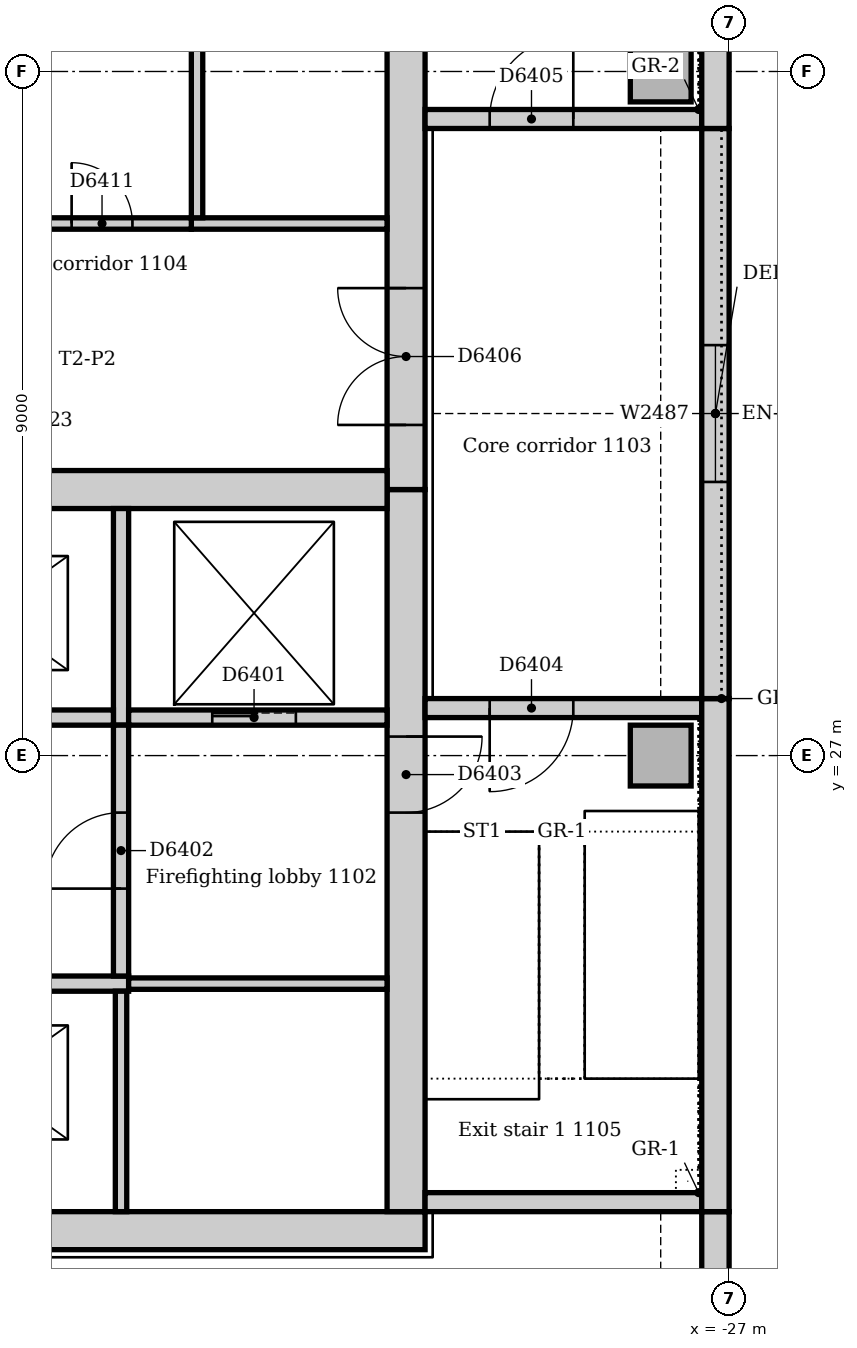
"""IFC4 building model, lengths in metres.
Left out: names, types, materials, properties, quantities, classifications, styles, units other than length and angle.
Written with IfcOpenShell. Run it as: python <this file> out.ifc"""

import sys

from ifc_helpers import new_model, si_unit, direction, frame, frame_2d, origin, origin_2d, place, context, subcontext, project, spatial, rectangle, extrude, element, fill, save


model = new_model("IFC4")
c1 = context("Model", 3, precision=1e-05, world=origin(), true_north=direction((0.0, 1.0)))
c2 = subcontext(c1, "Body", "Model", "MODEL_VIEW")
j1 = project(units=[si_unit("LENGTHUNIT", "METRE"), si_unit("PLANEANGLEUNIT", "RADIAN")], contexts=[c1])
p1 = place(None, origin())
s1 = spatial("IfcSite", under=j1, at=p1, CompositionType="ELEMENT")
p2 = place(p1, origin())
s2 = spatial("IfcBuilding", under=s1, at=p2, CompositionType="ELEMENT")
p3 = place(p2, frame((0.0, 0.0, 51.0)))
s3 = spatial("IfcBuildingStorey", under=s2, at=p3, CompositionType="ELEMENT", Elevation=51.0)
p4 = place(p3, frame((-42.5, 20.75, 0.0), z_axis=(0.0, 0.0, 1.0), x_axis=(1.0, 0.0, 0.0)))
e1 = element("IfcWall", 1, at=p4, inside=s3, PredefinedType="SOLIDWALL", context=c2, shape_type="SweptSolid", body=[
    extrude(rectangle(XDim=11.5, YDim=0.5, at=frame_2d((5.75, 0.0))), origin(), (0.0, 0.0, 1.0), 4.0),
])
p5 = place(p3, frame((-31.25, 21.0, 0.0), z_axis=(0.0, 0.0, 1.0), x_axis=(0.0, 1.0, 0.0)))
e2 = element("IfcWall", 2, at=p5, inside=s3, PredefinedType="SOLIDWALL", context=c2, shape_type="SweptSolid", body=[
    extrude(rectangle(XDim=9.5, YDim=0.5, at=frame_2d((4.75, 0.0))), origin(), (0.0, 0.0, 1.0), 4.0),
])
p6 = place(p5, frame((5.25, 0.0, 0.0)))
e3 = element("IfcOpeningElement", 3, at=p6, cuts=e2, PredefinedType="OPENING", context=c2, shape_type="SweptSolid", body=[
    extrude(rectangle(XDim=1.0, YDim=2.1, at=frame_2d((0.5, 1.05))), frame((0.0, 0.26, 0.0), z_axis=(0.0, -1.0, 0.0), x_axis=(1.0, 0.0, 0.0)), (0.0, 0.0, 1.0), 0.52),
])
p7 = place(p3, frame((-31.25, 30.5, 0.0), z_axis=(0.0, 0.0, 1.0), x_axis=(0.0, 1.0, 0.0)))
e4 = element("IfcWall", 4, at=p7, inside=s3, PredefinedType="SOLIDWALL", context=c2, shape_type="SweptSolid", body=[
    extrude(rectangle(XDim=11.5, YDim=0.5, at=frame_2d((5.75, 0.0))), origin(), (0.0, 0.0, 1.0), 4.0),
])
p8 = place(p7, frame((0.85, 0.0, 0.0)))
e5 = element("IfcOpeningElement", 5, at=p8, cuts=e4, PredefinedType="OPENING", context=c2, shape_type="SweptSolid", body=[
    extrude(rectangle(XDim=1.8, YDim=2.1, at=frame_2d((0.9, 1.05))), frame((0.0, 0.26, 0.0), z_axis=(0.0, -1.0, 0.0), x_axis=(1.0, 0.0, 0.0)), (0.0, 0.0, 1.0), 0.52),
])
p9 = place(p3, frame((-42.0, 30.5, 0.0), z_axis=(0.0, 0.0, 1.0), x_axis=(1.0, 0.0, 0.0)))
e6 = element("IfcWall", 6, at=p9, inside=s3, PredefinedType="SOLIDWALL", context=c2, shape_type="SweptSolid", body=[
    extrude(rectangle(XDim=10.5, YDim=0.5, at=frame_2d((5.25, 0.0))), origin(), (0.0, 0.0, 1.0), 4.0),
])
p10 = place(p3, frame((-31.0, 21.125, 0.0), z_axis=(0.0, 0.0, 1.0), x_axis=(1.0, 0.0, 0.0)))
e7 = element("IfcWall", 7, at=p10, inside=s3, PredefinedType="SOLIDWALL", context=c2, shape_type="SweptSolid", body=[
    extrude(rectangle(XDim=3.64, YDim=0.25, at=frame_2d((1.82, 0.0))), origin(), (0.0, 0.0, 1.0), 4.0),
])
p11 = place(p3, frame((-27.36, 27.625, 0.0), z_axis=(0.0, 0.0, 1.0), x_axis=(-1.0, 0.0, 0.0)))
e8 = element("IfcWall", 8, at=p11, inside=s3, PredefinedType="SOLIDWALL", context=c2, shape_type="SweptSolid", body=[
    extrude(rectangle(XDim=3.64, YDim=0.25, at=frame_2d((1.82, 0.0))), origin(), (0.0, 0.0, 1.0), 4.0),
])
p12 = place(p11, frame((1.69, 0.0, 0.0)))
e9 = element("IfcOpeningElement", 9, at=p12, cuts=e8, PredefinedType="OPENING", context=c2, shape_type="SweptSolid", body=[
    extrude(rectangle(XDim=1.1, YDim=2.1, at=frame_2d((0.55, 1.05))), frame((0.0, 0.135, 0.0), z_axis=(0.0, -1.0, 0.0), x_axis=(1.0, 0.0, 0.0)), (0.0, 0.0, 1.0), 0.27),
])
p13 = place(p3, frame((-31.0, 35.375, 0.0), z_axis=(0.0, 0.0, 1.0), x_axis=(1.0, 0.0, 0.0)))
e10 = element("IfcWall", 10, at=p13, inside=s3, PredefinedType="SOLIDWALL", context=c2, shape_type="SweptSolid", body=[
    extrude(rectangle(XDim=3.64, YDim=0.25, at=frame_2d((1.82, 0.0))), origin(), (0.0, 0.0, 1.0), 4.0),
])
p14 = place(p13, frame((0.85, 0.0, 0.0)))
e11 = element("IfcOpeningElement", 11, at=p14, cuts=e10, PredefinedType="OPENING", context=c2, shape_type="SweptSolid", body=[
    extrude(rectangle(XDim=1.1, YDim=2.1, at=frame_2d((0.55, 1.05))), frame((0.0, 0.135, 0.0), z_axis=(0.0, -1.0, 0.0), x_axis=(1.0, 0.0, 0.0)), (0.0, 0.0, 1.0), 0.27),
])
for number, where, z_axis, x_axis in (
    (12, (-27.9, 27.0, 0.0), (0.0, 0.0, 1.0), (1.0, 0.0, 0.0)),
    (13, (-27.9, 36.0, 0.0), (0.0, 0.0, 1.0), (1.0, 0.0, 0.0)),
):
    element("IfcColumn", number, at=place(p3, frame(where, z_axis=z_axis, x_axis=x_axis)), inside=s3, PredefinedType="COLUMN", context=c2, shape_type="SweptSolid", body=[
        extrude(rectangle(XDim=0.8, YDim=0.8, at=origin_2d()), origin(), (0.0, 0.0, 1.0), 4.0),
    ])
p15 = place(p3, frame((-27.18, 13.243, 0.0), z_axis=(0.0, 0.0, 1.0), x_axis=(0.0, 1.0, 0.0)))
e14 = element("IfcWall", 14, at=p15, inside=s3, PredefinedType="STANDARD", context=c2, shape_type="SweptSolid", body=[
    extrude(rectangle(XDim=7.757, YDim=0.36, at=frame_2d((3.879, 0.0))), origin(), (0.0, 0.0, 1.0), 3.85),
])
p16 = place(p15, frame((1.982, 0.0, 0.9)))
e15 = element("IfcOpeningElement", 15, at=p16, cuts=e14, PredefinedType="OPENING", context=c2, shape_type="SweptSolid", body=[
    extrude(rectangle(XDim=3.3, YDim=1.6, at=frame_2d((1.65, 0.8))), frame((0.0, 0.19, 0.0), z_axis=(0.0, -1.0, 0.0), x_axis=(1.0, 0.0, 0.0)), (0.0, 0.0, 1.0), 0.38),
])
p17 = place(p3, frame((-27.18, 21.0, 0.0), z_axis=(0.0, 0.0, 1.0), x_axis=(0.0, 1.0, 0.0)))
e16 = element("IfcWall", 16, at=p17, inside=s3, PredefinedType="STANDARD", context=c2, shape_type="SweptSolid", body=[
    extrude(rectangle(XDim=6.75, YDim=0.36, at=frame_2d((3.375, 0.0))), origin(), (0.0, 0.0, 1.0), 3.85),
])
p18 = place(p3, frame((-27.18, 27.75, 0.0), z_axis=(0.0, 0.0, 1.0), x_axis=(0.0, 1.0, 0.0)))
e17 = element("IfcWall", 17, at=p18, inside=s3, PredefinedType="STANDARD", context=c2, shape_type="SweptSolid", body=[
    extrude(rectangle(XDim=7.5, YDim=0.36, at=frame_2d((3.75, 0.0))), origin(), (0.0, 0.0, 1.0), 3.85),
])
p19 = place(p18, frame((2.85, 0.0, 1.2)))
e18 = element("IfcOpeningElement", 18, at=p19, cuts=e17, PredefinedType="OPENING", context=c2, shape_type="SweptSolid", body=[
    extrude(rectangle(XDim=1.8, YDim=1.2, at=frame_2d((0.9, 0.6))), frame((0.0, 0.19, 0.0), z_axis=(0.0, -1.0, 0.0), x_axis=(1.0, 0.0, 0.0)), (0.0, 0.0, 1.0), 0.38),
])
p20 = place(p3, frame((-27.18, 35.25, 0.0), z_axis=(0.0, 0.0, 1.0), x_axis=(0.0, 1.0, 0.0)))
e19 = element("IfcWall", 19, at=p20, inside=s3, PredefinedType="STANDARD", context=c2, shape_type="SweptSolid", body=[
    extrude(rectangle(XDim=6.75, YDim=0.36, at=frame_2d((3.375, 0.0))), origin(), (0.0, 0.0, 1.0), 3.85),
])
p21 = place(p3, frame((-34.9, 24.0, 0.0), z_axis=(0.0, 0.0, 1.0), x_axis=(-1.0, 0.0, 0.0)))
e20 = element("IfcWall", 20, at=p21, inside=s3, PredefinedType="SOLIDWALL", context=c2, shape_type="SweptSolid", body=[
    extrude(rectangle(XDim=3.5, YDim=0.2, at=frame_2d((1.75, 0.0))), origin(), (0.0, 0.0, 1.0), 4.0),
])
p22 = place(p21, frame((1.3, 0.0, 0.0)))
e21 = element("IfcOpeningElement", 21, at=p22, cuts=e20, PredefinedType="OPENING", context=c2, shape_type="SweptSolid", body=[
    extrude(rectangle(XDim=1.1, YDim=2.1, at=frame_2d((0.55, 1.05))), frame((0.0, 0.11, 0.0), z_axis=(0.0, -1.0, 0.0), x_axis=(1.0, 0.0, 0.0)), (0.0, 0.0, 1.0), 0.22),
])
p23 = place(p3, frame((-35.0, 27.4, 0.0), z_axis=(0.0, 0.0, 1.0), x_axis=(0.0, 1.0, 0.0)))
e22 = element("IfcWall", 22, at=p23, inside=s3, PredefinedType="SOLIDWALL", context=c2, shape_type="SweptSolid", body=[
    extrude(rectangle(XDim=2.85, YDim=0.2, at=frame_2d((1.425, 0.0))), origin(), (0.0, 0.0, 1.0), 4.0),
])
p24 = place(p3, frame((-38.4, 27.5, 0.0), z_axis=(0.0, 0.0, 1.0), x_axis=(1.0, 0.0, 0.0)))
e23 = element("IfcWall", 23, at=p24, inside=s3, PredefinedType="SOLIDWALL", context=c2, shape_type="SweptSolid", body=[
    extrude(rectangle(XDim=3.3, YDim=0.2, at=frame_2d((1.65, 0.0))), origin(), (0.0, 0.0, 1.0), 4.0),
])
p25 = place(p24, frame((1.1, 0.0, 0.0)))
e24 = element("IfcOpeningElement", 24, at=p25, cuts=e23, PredefinedType="OPENING", context=c2, shape_type="SweptSolid", body=[
    extrude(rectangle(XDim=1.1, YDim=2.1, at=frame_2d((0.55, 1.05))), frame((0.0, 0.11, 0.0), z_axis=(0.0, -1.0, 0.0), x_axis=(1.0, 0.0, 0.0)), (0.0, 0.0, 1.0), 0.22),
])
p26 = place(p3, frame((-34.9, 27.5, 0.0), z_axis=(0.0, 0.0, 1.0), x_axis=(1.0, 0.0, 0.0)))
e25 = element("IfcWall", 25, at=p26, inside=s3, PredefinedType="SOLIDWALL", context=c2, shape_type="SweptSolid", body=[
    extrude(rectangle(XDim=3.4, YDim=0.2, at=frame_2d((1.7, 0.0))), origin(), (0.0, 0.0, 1.0), 4.0),
])
p27 = place(p26, frame((1.1, 0.0, 0.0)))
e26 = element("IfcOpeningElement", 26, at=p27, cuts=e25, PredefinedType="OPENING", context=c2, shape_type="SweptSolid", body=[
    extrude(rectangle(XDim=1.1, YDim=2.1, at=frame_2d((0.55, 1.05))), frame((0.0, 0.11, 0.0), z_axis=(0.0, -1.0, 0.0), x_axis=(1.0, 0.0, 0.0)), (0.0, 0.0, 1.0), 0.22),
])
p28 = place(p3, frame((-35.0, 24.1, 0.0), z_axis=(0.0, 0.0, 1.0), x_axis=(0.0, 1.0, 0.0)))
e27 = element("IfcWall", 27, at=p28, inside=s3, PredefinedType="SOLIDWALL", context=c2, shape_type="SweptSolid", body=[
    extrude(rectangle(XDim=3.3, YDim=0.2, at=frame_2d((1.65, 0.0))), origin(), (0.0, 0.0, 1.0), 4.0),
])
p29 = place(p28, frame((1.15, 0.0, 0.0)))
e28 = element("IfcOpeningElement", 28, at=p29, cuts=e27, PredefinedType="OPENING", context=c2, shape_type="SweptSolid", body=[
    extrude(rectangle(XDim=1.0, YDim=2.1, at=frame_2d((0.5, 1.05))), frame((0.0, 0.11, 0.0), z_axis=(0.0, -1.0, 0.0), x_axis=(1.0, 0.0, 0.0)), (0.0, 0.0, 1.0), 0.22),
])
p30 = place(p3, frame((-35.0, 21.0, 0.0), z_axis=(0.0, 0.0, 1.0), x_axis=(0.0, 1.0, 0.0)))
e29 = element("IfcWall", 29, at=p30, inside=s3, PredefinedType="SOLIDWALL", context=c2, shape_type="SweptSolid", body=[
    extrude(rectangle(XDim=2.9, YDim=0.15, at=frame_2d((1.45, 0.0))), origin(), (0.0, 0.0, 1.0), 4.0),
])
p31 = place(p3, frame((-31.5, 24.0, 0.0), z_axis=(0.0, 0.0, 1.0), x_axis=(-1.0, 0.0, 0.0)))
e30 = element("IfcWall", 30, at=p31, inside=s3, PredefinedType="SOLIDWALL", context=c2, shape_type="SweptSolid", body=[
    extrude(rectangle(XDim=3.4, YDim=0.15, at=frame_2d((1.7, 0.0))), origin(), (0.0, 0.0, 1.0), 4.0),
])
p32 = place(p3, frame((-34.075, 34.0, 0.0), z_axis=(0.0, 0.0, 1.0), x_axis=(1.0, 0.0, 0.0)))
e31 = element("IfcWall", 31, at=p32, inside=s3, PredefinedType="SOLIDWALL", context=c2, shape_type="SweptSolid", body=[
    extrude(rectangle(XDim=2.575, YDim=0.15, at=frame_2d((1.288, 0.0))), origin(), (0.0, 0.0, 1.0), 4.0),
])
p33 = place(p3, frame((-34.0, 41.075, 0.0), z_axis=(0.0, 0.0, 1.0), x_axis=(0.0, -1.0, 0.0)))
e32 = element("IfcWall", 32, at=p33, inside=s3, PredefinedType="SOLIDWALL", context=c2, shape_type="SweptSolid", body=[
    extrude(rectangle(XDim=7.0, YDim=0.15, at=frame_2d((3.5, 0.0))), origin(), (0.0, 0.0, 1.0), 4.0),
])
p34 = place(p3, frame((-34.075, 34.0, 0.0), z_axis=(0.0, 0.0, 1.0), x_axis=(-1.0, 0.0, 0.0)))
e33 = element("IfcWall", 33, at=p34, inside=s3, PredefinedType="PARTITIONING", context=c2, shape_type="SweptSolid", body=[
    extrude(rectangle(XDim=2.35, YDim=0.15, at=frame_2d((1.175, 0.0))), origin(), (0.0, 0.0, 1.0), 3.85),
])
p35 = place(p34, frame((0.775, 0.0, 0.0)))
e34 = element("IfcOpeningElement", 34, at=p35, cuts=e33, PredefinedType="OPENING", context=c2, shape_type="SweptSolid", body=[
    extrude(rectangle(XDim=0.8, YDim=2.1, at=frame_2d((0.4, 1.05))), frame((0.0, 0.085, 0.0), z_axis=(0.0, -1.0, 0.0), x_axis=(1.0, 0.0, 0.0)), (0.0, 0.0, 1.0), 0.17),
])
p36 = place(p19, origin())
e35 = element("IfcWindow", 35, at=p36, inside=s3, PartitioningType="SINGLE_PANEL", PredefinedType="WINDOW", context=c2, shape_type="SweptSolid", body=[
    extrude(rectangle(XDim=1.8, YDim=1.2, at=frame_2d((0.9, 0.6))), frame((0.0, 0.13, 0.0), z_axis=(0.0, -1.0, 0.0), x_axis=(1.0, 0.0, 0.0)), (0.0, 0.0, 1.0), 0.06),
])
fill(e18, e35)
p37 = place(p27, origin())
e36 = element("IfcDoor", 36, at=p37, inside=s3, OperationType="SLIDING_TO_LEFT", PredefinedType="DOOR", context=c2, shape_type="SweptSolid", body=[
    extrude(rectangle(XDim=1.1, YDim=2.1, at=frame_2d((0.55, 1.05))), frame((0.0, 0.025, 0.0), z_axis=(0.0, -1.0, 0.0), x_axis=(1.0, 0.0, 0.0)), (0.0, 0.0, 1.0), 0.05),
])
fill(e26, e36)
p38 = place(p29, origin())
e37 = element("IfcDoor", 37, at=p38, inside=s3, OperationType="SINGLE_SWING_LEFT", PredefinedType="DOOR", context=c2, shape_type="SweptSolid", body=[
    extrude(rectangle(XDim=1.0, YDim=2.1, at=frame_2d((0.5, 1.05))), frame((0.0, 0.025, 0.0), z_axis=(0.0, -1.0, 0.0), x_axis=(1.0, 0.0, 0.0)), (0.0, 0.0, 1.0), 0.05),
])
fill(e28, e37)
p39 = place(p6, frame((1.0, 0.0, 0.0), z_axis=(0.0, 0.0, 1.0), x_axis=(-1.0, 0.0, 0.0)))
e38 = element("IfcDoor", 38, at=p39, inside=s3, OperationType="SINGLE_SWING_LEFT", PredefinedType="DOOR", context=c2, shape_type="SweptSolid", body=[
    extrude(rectangle(XDim=1.0, YDim=2.1, at=frame_2d((0.5, 1.05))), frame((0.0, 0.025, 0.0), z_axis=(0.0, -1.0, 0.0), x_axis=(1.0, 0.0, 0.0)), (0.0, 0.0, 1.0), 0.05),
])
fill(e3, e38)
p40 = place(p12, origin())
e39 = element("IfcDoor", 39, at=p40, inside=s3, OperationType="SINGLE_SWING_RIGHT", PredefinedType="DOOR", context=c2, shape_type="SweptSolid", body=[
    extrude(rectangle(XDim=1.1, YDim=2.1, at=frame_2d((0.55, 1.05))), frame((0.0, 0.025, 0.0), z_axis=(0.0, -1.0, 0.0), x_axis=(1.0, 0.0, 0.0)), (0.0, 0.0, 1.0), 0.05),
])
fill(e9, e39)
p41 = place(p14, origin())
e40 = element("IfcDoor", 40, at=p41, inside=s3, OperationType="SINGLE_SWING_RIGHT", PredefinedType="DOOR", context=c2, shape_type="SweptSolid", body=[
    extrude(rectangle(XDim=1.1, YDim=2.1, at=frame_2d((0.55, 1.05))), frame((0.0, 0.025, 0.0), z_axis=(0.0, -1.0, 0.0), x_axis=(1.0, 0.0, 0.0)), (0.0, 0.0, 1.0), 0.05),
])
fill(e11, e40)
p42 = place(p8, origin())
e41 = element("IfcDoor", 41, at=p42, inside=s3, OperationType="DOUBLE_DOOR_SINGLE_SWING", PredefinedType="DOOR", context=c2, shape_type="SweptSolid", body=[
    extrude(rectangle(XDim=1.8, YDim=2.1, at=frame_2d((0.9, 1.05))), frame((0.0, 0.025, 0.0), z_axis=(0.0, -1.0, 0.0), x_axis=(1.0, 0.0, 0.0)), (0.0, 0.0, 1.0), 0.05),
])
fill(e5, e41)
p43 = place(p35, frame((0.8, 0.0, 0.0), z_axis=(0.0, 0.0, 1.0), x_axis=(-1.0, 0.0, 0.0)))
e42 = element("IfcDoor", 42, at=p43, inside=s3, OperationType="SINGLE_SWING_LEFT", PredefinedType="DOOR", context=c2, shape_type="SweptSolid", body=[
    extrude(rectangle(XDim=0.8, YDim=2.1, at=frame_2d((0.4, 1.05))), frame((0.0, 0.025, 0.0), z_axis=(0.0, -1.0, 0.0), x_axis=(1.0, 0.0, 0.0)), (0.0, 0.0, 1.0), 0.05),
])
fill(e34, e42)
save(model, sys.argv[1])
